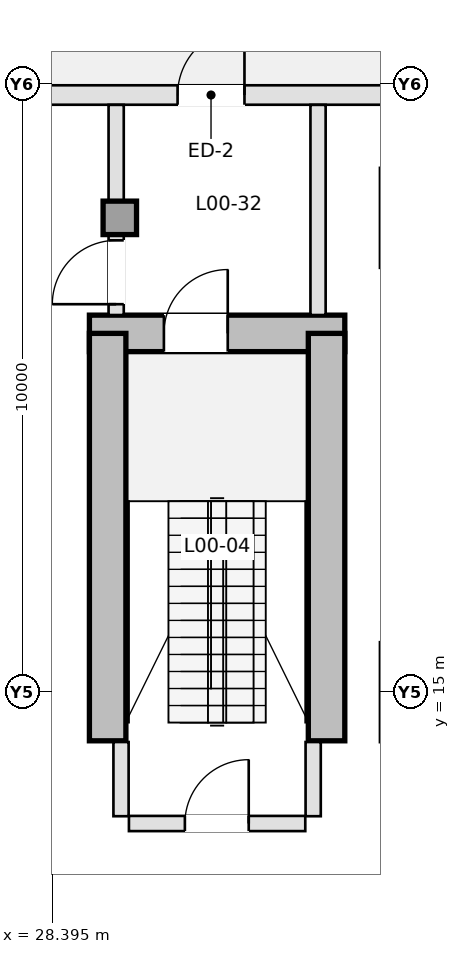
"""IFC4 building model, lengths in metres.
Left out: names, types, materials, properties, quantities, classifications, styles, units other than length and angle.
Written with IfcOpenShell. Run it as: python <this file> out.ifc"""

import sys

from ifc_helpers import new_model, si_unit, direction, frame, frame_2d, origin, origin_2d, place, context, subcontext, project, spatial, rectangle, extrude, element, fill, save


model = new_model("IFC4")
c1 = context("Model", 3, precision=1e-05, world=origin(), true_north=direction((0.0, 1.0)))
c2 = subcontext(c1, "Body", "Model", "MODEL_VIEW")
j1 = project(units=[si_unit("LENGTHUNIT", "METRE"), si_unit("PLANEANGLEUNIT", "RADIAN")], contexts=[c1])
p1 = place(None, origin())
s1 = spatial("IfcSite", under=j1, at=p1, CompositionType="ELEMENT")
p2 = place(p1, origin())
s2 = spatial("IfcBuilding", under=s1, at=p2, CompositionType="ELEMENT")
p3 = place(p2, origin())
s3 = spatial("IfcBuildingStorey", under=s2, at=p3, CompositionType="ELEMENT", Elevation=0.0)
p4 = place(p3, frame((29.0, 20.9, 0.0), z_axis=(0.0, 0.0, 1.0), x_axis=(1.0, 0.0, 0.0)))
e1 = element("IfcWall", 1, at=p4, inside=s3, PredefinedType="SHEAR", context=c2, shape_type="SweptSolid", body=[
    extrude(rectangle(XDim=4.2, YDim=0.6, at=frame_2d((2.1, 0.0))), origin(), (0.0, 0.0, 1.0), 5.0),
])
p5 = place(p4, frame((1.225, 0.0, 0.0)))
e2 = element("IfcOpeningElement", 2, at=p5, cuts=e1, PredefinedType="OPENING", context=c2, shape_type="SweptSolid", body=[
    extrude(rectangle(XDim=1.05, YDim=2.15, at=frame_2d((0.525, 1.075))), frame((0.0, 0.31, 0.0), z_axis=(0.0, -1.0, 0.0), x_axis=(1.0, 0.0, 0.0)), (0.0, 0.0, 1.0), 0.62),
])
for number, where, z_axis, x_axis in (
    (3, (29.3, 14.2, 0.0), (0.0, 0.0, 1.0), (0.0, 1.0, 0.0)),
    (4, (32.9, 14.2, 0.0), (0.0, 0.0, 1.0), (0.0, 1.0, 0.0)),
):
    element("IfcWall", number, at=place(p3, frame(where, z_axis=z_axis, x_axis=x_axis)), inside=s3, PredefinedType="SHEAR", context=c2, shape_type="SweptSolid", body=[
        extrude(rectangle(XDim=6.7, YDim=0.6, at=frame_2d((3.35, 0.0))), origin(), (0.0, 0.0, 1.0), 5.0),
    ])
p6 = place(p3, frame((29.5, 22.8, 0.0), z_axis=(0.0, 0.0, 1.0), x_axis=(1.0, 0.0, 0.0)))
e5 = element("IfcColumn", 5, at=p6, inside=s3, PredefinedType="PILASTER", context=c2, shape_type="SweptSolid", body=[
    extrude(rectangle(XDim=0.55, YDim=0.55, at=origin_2d()), origin(), (0.0, 0.0, 1.0), 5.0),
])
p7 = place(p3, frame((24.6, 24.82, 0.0), z_axis=(0.0, 0.0, 1.0), x_axis=(1.0, 0.0, 0.0)))
e6 = element("IfcWall", 6, at=p7, inside=s3, PredefinedType="STANDARD", context=c2, shape_type="SweptSolid", body=[
    extrude(rectangle(XDim=10.4, YDim=0.32, at=frame_2d((5.2, 0.0))), origin(), (0.0, 0.0, 1.0), 4.7),
])
p8 = place(p7, frame((5.85, 0.0, 0.0)))
e7 = element("IfcOpeningElement", 7, at=p8, cuts=e6, PredefinedType="OPENING", context=c2, shape_type="SweptSolid", body=[
    extrude(rectangle(XDim=1.1, YDim=2.2, at=frame_2d((0.55, 1.1))), frame((0.0, 0.17, 0.0), z_axis=(0.0, -1.0, 0.0), x_axis=(1.0, 0.0, 0.0)), (0.0, 0.0, 1.0), 0.34),
])
p9 = place(p7, frame((1.2, 0.0, 1.1)))
e8 = element("IfcOpeningElement", 8, at=p9, cuts=e6, PredefinedType="OPENING", context=c2, shape_type="SweptSolid", body=[
    extrude(rectangle(XDim=2.1, YDim=2.4, at=frame_2d((1.05, 1.2))), frame((0.0, 0.17, 0.0), z_axis=(0.0, -1.0, 0.0), x_axis=(1.0, 0.0, 0.0)), (0.0, 0.0, 1.0), 0.34),
])
p10 = place(p3, frame((29.65, 12.84, 0.0), z_axis=(0.0, 0.0, 1.0), x_axis=(1.0, 0.0, 0.0)))
e9 = element("IfcWall", 9, at=p10, inside=s3, PredefinedType="PARTITIONING", context=c2, shape_type="SweptSolid", body=[
    extrude(rectangle(XDim=2.9, YDim=0.25, at=frame_2d((1.45, 0.0))), origin(), (0.0, 0.0, 1.0), 4.7),
])
p11 = place(p10, frame((0.92, 0.0, 0.0)))
e10 = element("IfcOpeningElement", 10, at=p11, cuts=e9, PredefinedType="OPENING", context=c2, shape_type="SweptSolid", body=[
    extrude(rectangle(XDim=1.05, YDim=2.15, at=frame_2d((0.525, 1.075))), frame((0.0, 0.135, 0.0), z_axis=(0.0, -1.0, 0.0), x_axis=(1.0, 0.0, 0.0)), (0.0, 0.0, 1.0), 0.27),
])
for number, where, z_axis, x_axis in (
    (11, (29.52, 12.96, 0.0), (0.0, 0.0, 1.0), (0.0, 1.0, 0.0)),
    (12, (32.68, 12.96, 0.0), (0.0, 0.0, 1.0), (0.0, 1.0, 0.0)),
):
    element("IfcWall", number, at=place(p3, frame(where, z_axis=z_axis, x_axis=x_axis)), inside=s3, PredefinedType="PARTITIONING", context=c2, shape_type="SweptSolid", body=[
        extrude(rectangle(XDim=1.22, YDim=0.25, at=frame_2d((0.61, 0.0))), origin(), (0.0, 0.0, 1.0), 4.7),
    ])
p12 = place(p3, frame((29.44, 21.202, 0.0), z_axis=(0.0, 0.0, 1.0), x_axis=(0.0, 1.0, 0.0)))
e13 = element("IfcWall", 13, at=p12, inside=s3, PredefinedType="PARTITIONING", context=c2, shape_type="SweptSolid", body=[
    extrude(rectangle(XDim=1.321, YDim=0.25, at=frame_2d((0.661, 0.0))), origin(), (0.0, 0.0, 1.0), 4.7),
])
p13 = place(p12, frame((0.178, 0.0, 0.0)))
e14 = element("IfcOpeningElement", 14, at=p13, cuts=e13, PredefinedType="OPENING", context=c2, shape_type="SweptSolid", body=[
    extrude(rectangle(XDim=1.05, YDim=2.15, at=frame_2d((0.525, 1.075))), frame((0.0, 0.135, 0.0), z_axis=(0.0, -1.0, 0.0), x_axis=(1.0, 0.0, 0.0)), (0.0, 0.0, 1.0), 0.27),
])
p14 = place(p3, frame((29.44, 23.077, 0.0), z_axis=(0.0, 0.0, 1.0), x_axis=(0.0, 1.0, 0.0)))
e15 = element("IfcWall", 15, at=p14, inside=s3, PredefinedType="PARTITIONING", context=c2, shape_type="SweptSolid", body=[
    extrude(rectangle(XDim=1.581, YDim=0.25, at=frame_2d((0.791, 0.0))), origin(), (0.0, 0.0, 1.0), 4.7),
])
p15 = place(p3, frame((32.76, 21.202, 0.0), z_axis=(0.0, 0.0, 1.0), x_axis=(0.0, 1.0, 0.0)))
e16 = element("IfcWall", 16, at=p15, inside=s3, PredefinedType="PARTITIONING", context=c2, shape_type="SweptSolid", body=[
    extrude(rectangle(XDim=3.456, YDim=0.25, at=frame_2d((1.728, 0.0))), origin(), (0.0, 0.0, 1.0), 4.7),
])
p16 = place(p8, origin())
e17 = element("IfcDoor", 17, at=p16, inside=s3, OperationType="SINGLE_SWING_RIGHT", PredefinedType="DOOR", context=c2, shape_type="SweptSolid", body=[
    extrude(rectangle(XDim=1.1, YDim=2.2, at=frame_2d((0.55, 1.1))), frame((0.0, 0.025, 0.0), z_axis=(0.0, -1.0, 0.0), x_axis=(1.0, 0.0, 0.0)), (0.0, 0.0, 1.0), 0.05),
])
fill(e7, e17)
p17 = place(p11, origin())
e18 = element("IfcDoor", 18, at=p17, inside=s3, OperationType="SINGLE_SWING_RIGHT", PredefinedType="DOOR", context=c2, shape_type="SweptSolid", body=[
    extrude(rectangle(XDim=1.05, YDim=2.15, at=frame_2d((0.525, 1.075))), frame((0.0, 0.025, 0.0), z_axis=(0.0, -1.0, 0.0), x_axis=(1.0, 0.0, 0.0)), (0.0, 0.0, 1.0), 0.05),
])
fill(e10, e18)
p18 = place(p13, origin())
e19 = element("IfcDoor", 19, at=p18, inside=s3, OperationType="SINGLE_SWING_LEFT", PredefinedType="DOOR", context=c2, shape_type="SweptSolid", body=[
    extrude(rectangle(XDim=1.05, YDim=2.15, at=frame_2d((0.525, 1.075))), frame((0.0, 0.025, 0.0), z_axis=(0.0, -1.0, 0.0), x_axis=(1.0, 0.0, 0.0)), (0.0, 0.0, 1.0), 0.05),
])
fill(e14, e19)
p19 = place(p5, origin())
e20 = element("IfcDoor", 20, at=p19, inside=s3, OperationType="SINGLE_SWING_RIGHT", PredefinedType="DOOR", context=c2, shape_type="SweptSolid", body=[
    extrude(rectangle(XDim=1.05, YDim=2.15, at=frame_2d((0.525, 1.075))), frame((0.0, 0.025, 0.0), z_axis=(0.0, -1.0, 0.0), x_axis=(1.0, 0.0, 0.0)), (0.0, 0.0, 1.0), 0.05),
])
fill(e2, e20)
save(model, sys.argv[1])
